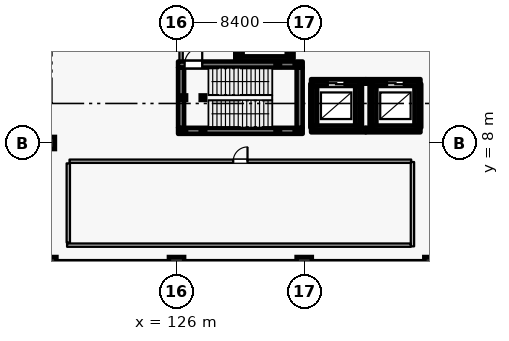
"""IFC4 building model, lengths in metres.
Left out: names, types, materials, properties, quantities, classifications, styles, units other than length and angle.
Written with IfcOpenShell. Run it as: python <this file> out.ifc"""

import sys

from ifc_helpers import new_model, si_unit, direction, frame, frame_2d, origin, origin_2d, place, context, subcontext, project, spatial, rectangle, hollow_rectangle, extrude, element, fill, save


model = new_model("IFC4")
c1 = context("Model", 3, precision=1e-05, world=origin(), true_north=direction((0.0, 1.0)))
c2 = subcontext(c1, "Body", "Model", "MODEL_VIEW")
j1 = project(units=[si_unit("LENGTHUNIT", "METRE"), si_unit("PLANEANGLEUNIT", "RADIAN")], contexts=[c1])
p1 = place(None, origin())
s1 = spatial("IfcSite", under=j1, at=p1, CompositionType="ELEMENT")
p2 = place(p1, origin())
s2 = spatial("IfcBuilding", under=s1, at=p2, CompositionType="ELEMENT")
p3 = place(p2, frame((0.0, 0.0, -5.4)))
s3 = spatial("IfcBuildingStorey", under=s2, at=p3, CompositionType="ELEMENT", Elevation=-5.4)
p4 = place(p3, frame((117.6, 0.0, 0.0), z_axis=(0.0, 0.0, 1.0), x_axis=(1.0, 0.0, 0.0)))
e1 = element("IfcColumn", 1, at=p4, inside=s3, PredefinedType="COLUMN", context=c2, shape_type="SweptSolid", body=[
    extrude(rectangle(XDim=1.0, YDim=1.0, at=origin_2d()), origin(), (0.0, 0.0, 1.0), 5.4),
])
p5 = place(p3, frame((117.6, 8.0, 0.0), z_axis=(0.0, 0.0, 1.0), x_axis=(1.0, 0.0, 0.0)))
e2 = element("IfcColumn", 2, at=p5, inside=s3, PredefinedType="COLUMN", context=c2, shape_type="SweptSolid", body=[
    extrude(rectangle(XDim=0.8, YDim=0.8, at=origin_2d()), origin(), (0.0, 0.0, 1.0), 5.4),
])
for number, where, z_axis, x_axis in (
    (3, (126.0, 0.0, 0.0), (0.0, 0.0, 1.0), (1.0, 0.0, 0.0)),
    (4, (134.4, 0.0, 0.0), (0.0, 0.0, 1.0), (1.0, 0.0, 0.0)),
    (5, (142.8, 0.0, 0.0), (0.0, 0.0, 1.0), (1.0, 0.0, 0.0)),
):
    element("IfcColumn", number, at=place(p3, frame(where, z_axis=z_axis, x_axis=x_axis)), inside=s3, PredefinedType="COLUMN", context=c2, shape_type="SweptSolid", body=[
        extrude(rectangle(XDim=1.0, YDim=1.0, at=origin_2d()), origin(), (0.0, 0.0, 1.0), 5.4),
    ])
p6 = place(p3, frame((134.85, 8.85, -1.4), z_axis=(0.0, 0.0, 1.0), x_axis=(1.0, 0.0, 0.0)))
e6 = element("IfcWall", 6, at=p6, inside=s3, PredefinedType="USERDEFINED", context=c2, shape_type="SweptSolid", body=[
    extrude(rectangle(XDim=3.6, YDim=0.3, at=frame_2d((1.8, 0.0))), origin(), (0.0, 0.0, 1.0), 1.4),
])
p7 = place(p3, frame((138.05, 9.01, -1.4), z_axis=(0.0, 0.0, 1.0), x_axis=(0.0, 1.0, 0.0)))
e7 = element("IfcWall", 7, at=p7, inside=s3, PredefinedType="USERDEFINED", context=c2, shape_type="SweptSolid", body=[
    extrude(rectangle(XDim=2.88, YDim=0.3, at=frame_2d((1.44, 0.0))), origin(), (0.0, 0.0, 1.0), 1.4),
])
p8 = place(p3, frame((138.45, 12.05, -1.4), z_axis=(0.0, 0.0, 1.0), x_axis=(-1.0, 0.0, 0.0)))
e8 = element("IfcWall", 8, at=p8, inside=s3, PredefinedType="USERDEFINED", context=c2, shape_type="SweptSolid", body=[
    extrude(rectangle(XDim=3.6, YDim=0.3, at=frame_2d((1.8, 0.0))), origin(), (0.0, 0.0, 1.0), 1.4),
])
p9 = place(p3, frame((134.95, 11.89, -1.4), z_axis=(0.0, 0.0, 1.0), x_axis=(0.0, -1.0, 0.0)))
e9 = element("IfcWall", 9, at=p9, inside=s3, PredefinedType="USERDEFINED", context=c2, shape_type="SweptSolid", body=[
    extrude(rectangle(XDim=2.88, YDim=0.3, at=frame_2d((1.44, 0.0))), origin(), (0.0, 0.0, 1.0), 1.4),
])
p10 = place(p3, frame((138.45, 8.85, -1.4), z_axis=(0.0, 0.0, 1.0), x_axis=(1.0, 0.0, 0.0)))
e10 = element("IfcWall", 10, at=p10, inside=s3, PredefinedType="USERDEFINED", context=c2, shape_type="SweptSolid", body=[
    extrude(rectangle(XDim=3.6, YDim=0.3, at=frame_2d((1.8, 0.0))), origin(), (0.0, 0.0, 1.0), 1.4),
])
p11 = place(p3, frame((141.95, 9.01, -1.4), z_axis=(0.0, 0.0, 1.0), x_axis=(0.0, 1.0, 0.0)))
e11 = element("IfcWall", 11, at=p11, inside=s3, PredefinedType="USERDEFINED", context=c2, shape_type="SweptSolid", body=[
    extrude(rectangle(XDim=2.88, YDim=0.3, at=frame_2d((1.44, 0.0))), origin(), (0.0, 0.0, 1.0), 1.4),
])
p12 = place(p3, frame((142.05, 12.05, -1.4), z_axis=(0.0, 0.0, 1.0), x_axis=(-1.0, 0.0, 0.0)))
e12 = element("IfcWall", 12, at=p12, inside=s3, PredefinedType="USERDEFINED", context=c2, shape_type="SweptSolid", body=[
    extrude(rectangle(XDim=3.6, YDim=0.3, at=frame_2d((1.8, 0.0))), origin(), (0.0, 0.0, 1.0), 1.4),
])
p13 = place(p3, frame((138.85, 11.89, -1.4), z_axis=(0.0, 0.0, 1.0), x_axis=(0.0, -1.0, 0.0)))
e13 = element("IfcWall", 13, at=p13, inside=s3, PredefinedType="USERDEFINED", context=c2, shape_type="SweptSolid", body=[
    extrude(rectangle(XDim=2.88, YDim=0.3, at=frame_2d((1.44, 0.0))), origin(), (0.0, 0.0, 1.0), 1.4),
])
p14 = place(p3, frame((129.95, 13.4, -1.4), z_axis=(0.0, 0.0, 1.0), x_axis=(1.0, 0.0, 0.0)))
e14 = element("IfcWall", 14, at=p14, inside=s3, PredefinedType="USERDEFINED", context=c2, shape_type="SweptSolid", body=[
    extrude(rectangle(XDim=3.7, YDim=0.3, at=frame_2d((1.85, 0.0))), origin(), (0.0, 0.0, 1.0), 1.4),
])
for number, where, z_axis, x_axis in (
    (15, (133.55, 13.56, -1.4), (0.0, 0.0, 1.0), (0.0, 1.0, 0.0)),
    (16, (130.05, 16.44, -1.4), (0.0, 0.0, 1.0), (0.0, -1.0, 0.0)),
):
    element("IfcWall", number, at=place(p3, frame(where, z_axis=z_axis, x_axis=x_axis)), inside=s3, PredefinedType="USERDEFINED", context=c2, shape_type="SweptSolid", body=[
        extrude(rectangle(XDim=2.88, YDim=0.3, at=frame_2d((1.44, 0.0))), origin(), (0.0, 0.0, 1.0), 1.4),
    ])
for number, where, z_axis, x_axis in (
    (17, (125.5, 0.0, 0.0), (0.0, 0.0, 1.0), (-1.0, 0.0, 0.0)),
    (18, (133.9, 0.0, 0.0), (0.0, 0.0, 1.0), (-1.0, 0.0, 0.0)),
):
    element("IfcWall", number, at=place(p3, frame(where, z_axis=z_axis, x_axis=x_axis)), inside=s3, PredefinedType="USERDEFINED", context=c2, shape_type="SweptSolid", body=[
        extrude(rectangle(XDim=7.4, YDim=0.45, at=frame_2d((3.7, 0.0))), origin(), (0.0, 0.0, 1.0), 4.3),
    ])
p15 = place(p3, frame((142.3, 0.0, 0.0), z_axis=(0.0, 0.0, 1.0), x_axis=(-1.0, 0.0, 0.0)))
e19 = element("IfcWall", 19, at=p15, inside=s3, PredefinedType="USERDEFINED", context=c2, shape_type="SweptSolid", body=[
    extrude(rectangle(XDim=7.4, YDim=0.45, at=frame_2d((3.7, 0.0))), origin(), (0.0, 0.0, 1.0), 4.3),
])
p16 = place(p3, frame((134.95, 9.0, 0.0), z_axis=(0.0, 0.0, 1.0), x_axis=(1.0, 0.0, 0.0)))
e20 = element("IfcWall", 20, at=p16, inside=s3, PredefinedType="SHEAR", context=c2, shape_type="SweptSolid", body=[
    extrude(rectangle(XDim=3.1, YDim=0.3, at=frame_2d((1.55, 0.0))), origin(), (0.0, 0.0, 1.0), 4.995),
])
p17 = place(p3, frame((137.9, 9.155, 0.0), z_axis=(0.0, 0.0, 1.0), x_axis=(0.0, 1.0, 0.0)))
e21 = element("IfcWall", 21, at=p17, inside=s3, PredefinedType="SHEAR", context=c2, shape_type="SweptSolid", body=[
    extrude(rectangle(XDim=2.59, YDim=0.3, at=frame_2d((1.295, 0.0))), origin(), (0.0, 0.0, 1.0), 4.995),
])
p18 = place(p3, frame((138.05, 11.9, 0.0), z_axis=(0.0, 0.0, 1.0), x_axis=(-1.0, 0.0, 0.0)))
e22 = element("IfcWall", 22, at=p18, inside=s3, PredefinedType="SHEAR", context=c2, shape_type="SweptSolid", body=[
    extrude(rectangle(XDim=3.1, YDim=0.3, at=frame_2d((1.55, 0.0))), origin(), (0.0, 0.0, 1.0), 4.995),
])
p19 = place(p18, frame((1.0, 0.0, 0.0)))
e23 = element("IfcOpeningElement", 23, at=p19, cuts=e22, PredefinedType="OPENING", context=c2, shape_type="SweptSolid", body=[
    extrude(rectangle(XDim=1.1, YDim=2.2, at=frame_2d((0.55, 1.1))), frame((0.0, 0.16, 0.0), z_axis=(0.0, -1.0, 0.0), x_axis=(1.0, 0.0, 0.0)), (0.0, 0.0, 1.0), 0.32),
])
p20 = place(p3, frame((135.1, 11.745, 0.0), z_axis=(0.0, 0.0, 1.0), x_axis=(0.0, -1.0, 0.0)))
e24 = element("IfcWall", 24, at=p20, inside=s3, PredefinedType="SHEAR", context=c2, shape_type="SweptSolid", body=[
    extrude(rectangle(XDim=2.59, YDim=0.3, at=frame_2d((1.295, 0.0))), origin(), (0.0, 0.0, 1.0), 4.995),
])
p21 = place(p3, frame((138.85, 9.0, 0.0), z_axis=(0.0, 0.0, 1.0), x_axis=(1.0, 0.0, 0.0)))
e25 = element("IfcWall", 25, at=p21, inside=s3, PredefinedType="SHEAR", context=c2, shape_type="SweptSolid", body=[
    extrude(rectangle(XDim=3.1, YDim=0.3, at=frame_2d((1.55, 0.0))), origin(), (0.0, 0.0, 1.0), 4.995),
])
p22 = place(p3, frame((141.8, 9.155, 0.0), z_axis=(0.0, 0.0, 1.0), x_axis=(0.0, 1.0, 0.0)))
e26 = element("IfcWall", 26, at=p22, inside=s3, PredefinedType="SHEAR", context=c2, shape_type="SweptSolid", body=[
    extrude(rectangle(XDim=2.59, YDim=0.3, at=frame_2d((1.295, 0.0))), origin(), (0.0, 0.0, 1.0), 4.995),
])
p23 = place(p3, frame((141.95, 11.9, 0.0), z_axis=(0.0, 0.0, 1.0), x_axis=(-1.0, 0.0, 0.0)))
e27 = element("IfcWall", 27, at=p23, inside=s3, PredefinedType="SHEAR", context=c2, shape_type="SweptSolid", body=[
    extrude(rectangle(XDim=3.1, YDim=0.3, at=frame_2d((1.55, 0.0))), origin(), (0.0, 0.0, 1.0), 4.995),
])
p24 = place(p23, frame((1.0, 0.0, 0.0)))
e28 = element("IfcOpeningElement", 28, at=p24, cuts=e27, PredefinedType="OPENING", context=c2, shape_type="SweptSolid", body=[
    extrude(rectangle(XDim=1.1, YDim=2.2, at=frame_2d((0.55, 1.1))), frame((0.0, 0.16, 0.0), z_axis=(0.0, -1.0, 0.0), x_axis=(1.0, 0.0, 0.0)), (0.0, 0.0, 1.0), 0.32),
])
p25 = place(p3, frame((139.0, 11.745, 0.0), z_axis=(0.0, 0.0, 1.0), x_axis=(0.0, -1.0, 0.0)))
e29 = element("IfcWall", 29, at=p25, inside=s3, PredefinedType="SHEAR", context=c2, shape_type="SweptSolid", body=[
    extrude(rectangle(XDim=2.59, YDim=0.3, at=frame_2d((1.295, 0.0))), origin(), (0.0, 0.0, 1.0), 4.995),
])
p26 = place(p3, frame((130.05, 13.55, 0.0), z_axis=(0.0, 0.0, 1.0), x_axis=(1.0, 0.0, 0.0)))
e30 = element("IfcWall", 30, at=p26, inside=s3, PredefinedType="SHEAR", context=c2, shape_type="SweptSolid", body=[
    extrude(rectangle(XDim=3.5, YDim=0.3, at=frame_2d((1.75, 0.0))), origin(), (0.0, 0.0, 1.0), 4.995),
])
for number, where, z_axis, x_axis in (
    (31, (133.4, 13.705, 0.0), (0.0, 0.0, 1.0), (0.0, 1.0, 0.0)),
    (32, (130.2, 16.295, 0.0), (0.0, 0.0, 1.0), (0.0, -1.0, 0.0)),
):
    element("IfcWall", number, at=place(p3, frame(where, z_axis=z_axis, x_axis=x_axis)), inside=s3, PredefinedType="SHEAR", context=c2, shape_type="SweptSolid", body=[
        extrude(rectangle(XDim=2.59, YDim=0.3, at=frame_2d((1.295, 0.0))), origin(), (0.0, 0.0, 1.0), 4.995),
    ])
p27 = place(p3, frame((126.1, 8.8, 0.0), z_axis=(0.0, 0.0, 1.0), x_axis=(1.0, 0.0, 0.0)))
e33 = element("IfcWall", 33, at=p27, inside=s3, PredefinedType="SHEAR", context=c2, shape_type="SweptSolid", body=[
    extrude(rectangle(XDim=8.2, YDim=0.4, at=frame_2d((4.1, 0.0))), origin(), (0.0, 0.0, 1.0), 4.995),
])
p28 = place(p3, frame((134.1, 9.005, 0.0), z_axis=(0.0, 0.0, 1.0), x_axis=(0.0, 1.0, 0.0)))
e34 = element("IfcWall", 34, at=p28, inside=s3, PredefinedType="SHEAR", context=c2, shape_type="SweptSolid", body=[
    extrude(rectangle(XDim=3.95, YDim=0.4, at=frame_2d((1.975, 0.0))), origin(), (0.0, 0.0, 1.0), 4.995),
])
p29 = place(p3, frame((126.1, 13.16, 0.0), z_axis=(0.0, 0.0, 1.0), x_axis=(1.0, 0.0, 0.0)))
e35 = element("IfcWall", 35, at=p29, inside=s3, PredefinedType="SHEAR", context=c2, shape_type="SweptSolid", body=[
    extrude(rectangle(XDim=8.2, YDim=0.4, at=frame_2d((4.1, 0.0))), origin(), (0.0, 0.0, 1.0), 4.995),
])
p30 = place(p29, frame((0.43, 0.0, 0.0)))
e36 = element("IfcOpeningElement", 36, at=p30, cuts=e35, PredefinedType="OPENING", context=c2, shape_type="SweptSolid", body=[
    extrude(rectangle(XDim=1.16, YDim=2.2, at=frame_2d((0.58, 1.1))), frame((0.0, 0.21, 0.0), z_axis=(0.0, -1.0, 0.0), x_axis=(1.0, 0.0, 0.0)), (0.0, 0.0, 1.0), 0.42),
])
p31 = place(p3, frame((126.3, 9.005, 0.0), z_axis=(0.0, 0.0, 1.0), x_axis=(0.0, 1.0, 0.0)))
e37 = element("IfcWall", 37, at=p31, inside=s3, PredefinedType="SHEAR", context=c2, shape_type="SweptSolid", body=[
    extrude(rectangle(XDim=3.95, YDim=0.4, at=frame_2d((1.975, 0.0))), origin(), (0.0, 0.0, 1.0), 4.995),
])
p32 = place(p3, frame((126.3, 13.365, 0.0), z_axis=(0.0, 0.0, 1.0), x_axis=(0.0, 1.0, 0.0)))
e38 = element("IfcWall", 38, at=p32, inside=s3, PredefinedType="PARTITIONING", context=c2, shape_type="SweptSolid", body=[
    extrude(rectangle(XDim=5.82, YDim=0.22, at=frame_2d((2.91, 0.0))), origin(), (0.0, 0.0, 1.0), 4.05),
])
p33 = place(p3, frame((129.9, 13.365, 0.0), z_axis=(0.0, 0.0, 1.0), x_axis=(0.0, 1.0, 0.0)))
e39 = element("IfcWall", 39, at=p33, inside=s3, PredefinedType="PARTITIONING", context=c2, shape_type="SweptSolid", body=[
    extrude(rectangle(XDim=5.82, YDim=0.22, at=frame_2d((2.91, 0.0))), origin(), (0.0, 0.0, 1.0), 4.995),
])
p34 = place(p33, frame((3.335, 0.0, 0.0)))
e40 = element("IfcOpeningElement", 40, at=p34, cuts=e39, PredefinedType="OPENING", context=c2, shape_type="SweptSolid", body=[
    extrude(rectangle(XDim=1.24, YDim=2.2, at=frame_2d((0.62, 1.1))), frame((0.0, 0.12, 0.0), z_axis=(0.0, -1.0, 0.0), x_axis=(1.0, 0.0, 0.0)), (0.0, 0.0, 1.0), 0.24),
])
for number, where, z_axis, x_axis in (
    (41, (126.48, 8.8, 0.0), (0.0, 0.0, 1.0), (1.0, 0.0, 0.0)),
    (42, (126.48, 10.98, 0.0), (0.0, 0.0, 1.0), (1.0, 0.0, 0.0)),
    (43, (127.74, 8.8, 0.0), (0.0, 0.0, 1.0), (1.0, 0.0, 0.0)),
    (44, (127.74, 10.98, 0.0), (0.0, 0.0, 1.0), (1.0, 0.0, 0.0)),
):
    element("IfcColumn", number, at=place(p3, frame(where, z_axis=z_axis, x_axis=x_axis)), inside=s3, PredefinedType="COLUMN", context=c2, shape_type="SweptSolid", body=[
        extrude(hollow_rectangle(XDim=0.3, YDim=0.3, WallThickness=0.012, at=origin_2d()), origin(), (0.0, 0.0, 1.0), 5.22),
    ])
for number, where, z_axis, x_axis in (
    (45, (132.66, 8.8, 0.0), (0.0, 0.0, 1.0), (1.0, 0.0, 0.0)),
    (46, (132.66, 13.16, 0.0), (0.0, 0.0, 1.0), (1.0, 0.0, 0.0)),
    (47, (133.92, 8.8, 0.0), (0.0, 0.0, 1.0), (1.0, 0.0, 0.0)),
    (48, (133.92, 13.16, 0.0), (0.0, 0.0, 1.0), (1.0, 0.0, 0.0)),
):
    element("IfcColumn", number, at=place(p3, frame(where, z_axis=z_axis, x_axis=x_axis)), inside=s3, PredefinedType="COLUMN", context=c2, shape_type="SweptSolid", body=[
        extrude(hollow_rectangle(XDim=0.3, YDim=0.3, WallThickness=0.012, at=origin_2d()), origin(), (0.0, 0.0, 1.0), 2.52),
    ])
p35 = place(p3, frame((118.96, 6.8, 0.0), z_axis=(0.0, 0.0, 1.0), x_axis=(1.0, 0.0, 0.0)))
e49 = element("IfcWall", 49, at=p35, inside=s3, PredefinedType="PARTITIONING", context=c2, shape_type="SweptSolid", body=[
    extrude(rectangle(XDim=22.48, YDim=0.22, at=frame_2d((11.24, 0.0))), origin(), (0.0, 0.0, 1.0), 4.995),
])
p36 = place(p35, frame((10.77, 0.0, 0.0)))
e50 = element("IfcOpeningElement", 50, at=p36, cuts=e49, PredefinedType="OPENING", context=c2, shape_type="SweptSolid", body=[
    extrude(rectangle(XDim=0.94, YDim=2.15, at=frame_2d((0.47, 1.075))), frame((0.0, 0.12, 0.0), z_axis=(0.0, -1.0, 0.0), x_axis=(1.0, 0.0, 0.0)), (0.0, 0.0, 1.0), 0.24),
])
p37 = place(p3, frame((118.88, 1.45, 0.0), z_axis=(0.0, 0.0, 1.0), x_axis=(0.0, 1.0, 0.0)))
e51 = element("IfcWall", 51, at=p37, inside=s3, PredefinedType="PARTITIONING", context=c2, shape_type="SweptSolid", body=[
    extrude(rectangle(XDim=5.21, YDim=0.22, at=frame_2d((2.605, 0.0))), origin(), (0.0, 0.0, 1.0), 4.995),
])
p38 = place(p3, frame((141.52, 1.2, 0.0), z_axis=(0.0, 0.0, 1.0), x_axis=(0.0, 1.0, 0.0)))
e52 = element("IfcWall", 52, at=p38, inside=s3, PredefinedType="PARTITIONING", context=c2, shape_type="SweptSolid", body=[
    extrude(rectangle(XDim=5.548, YDim=0.22, at=frame_2d((2.774, 0.0))), origin(), (0.0, 0.0, 1.0), 4.995),
])
p39 = place(p3, frame((118.8, 1.28, 0.0), z_axis=(0.0, 0.0, 1.0), x_axis=(1.0, 0.0, 0.0)))
e53 = element("IfcWall", 53, at=p39, inside=s3, PredefinedType="PARTITIONING", context=c2, shape_type="SweptSolid", body=[
    extrude(rectangle(XDim=22.61, YDim=0.22, at=frame_2d((11.305, 0.0))), origin(), (0.0, 0.0, 1.0), 4.995),
])
p40 = place(p19, origin())
e54 = element("IfcDoor", 54, at=p40, inside=s3, OperationType="DOUBLE_DOOR_SLIDING", PredefinedType="DOOR", context=c2, shape_type="SweptSolid", body=[
    extrude(rectangle(XDim=1.1, YDim=2.2, at=frame_2d((0.55, 1.1))), frame((0.0, 0.025, 0.0), z_axis=(0.0, -1.0, 0.0), x_axis=(1.0, 0.0, 0.0)), (0.0, 0.0, 1.0), 0.05),
])
fill(e23, e54)
p41 = place(p24, origin())
e55 = element("IfcDoor", 55, at=p41, inside=s3, OperationType="DOUBLE_DOOR_SLIDING", PredefinedType="DOOR", context=c2, shape_type="SweptSolid", body=[
    extrude(rectangle(XDim=1.1, YDim=2.2, at=frame_2d((0.55, 1.1))), frame((0.0, 0.025, 0.0), z_axis=(0.0, -1.0, 0.0), x_axis=(1.0, 0.0, 0.0)), (0.0, 0.0, 1.0), 0.05),
])
fill(e28, e55)
p42 = place(p30, origin())
e56 = element("IfcDoor", 56, at=p42, inside=s3, OperationType="SINGLE_SWING_RIGHT", PredefinedType="DOOR", context=c2, shape_type="SweptSolid", body=[
    extrude(rectangle(XDim=1.16, YDim=2.2, at=frame_2d((0.58, 1.1))), frame((0.0, 0.025, 0.0), z_axis=(0.0, -1.0, 0.0), x_axis=(1.0, 0.0, 0.0)), (0.0, 0.0, 1.0), 0.05),
])
fill(e36, e56)
p43 = place(p36, origin())
e57 = element("IfcDoor", 57, at=p43, inside=s3, OperationType="SINGLE_SWING_RIGHT", PredefinedType="DOOR", context=c2, shape_type="SweptSolid", body=[
    extrude(rectangle(XDim=0.94, YDim=2.15, at=frame_2d((0.47, 1.075))), frame((0.0, 0.025, 0.0), z_axis=(0.0, -1.0, 0.0), x_axis=(1.0, 0.0, 0.0)), (0.0, 0.0, 1.0), 0.05),
])
fill(e50, e57)
save(model, sys.argv[1])
